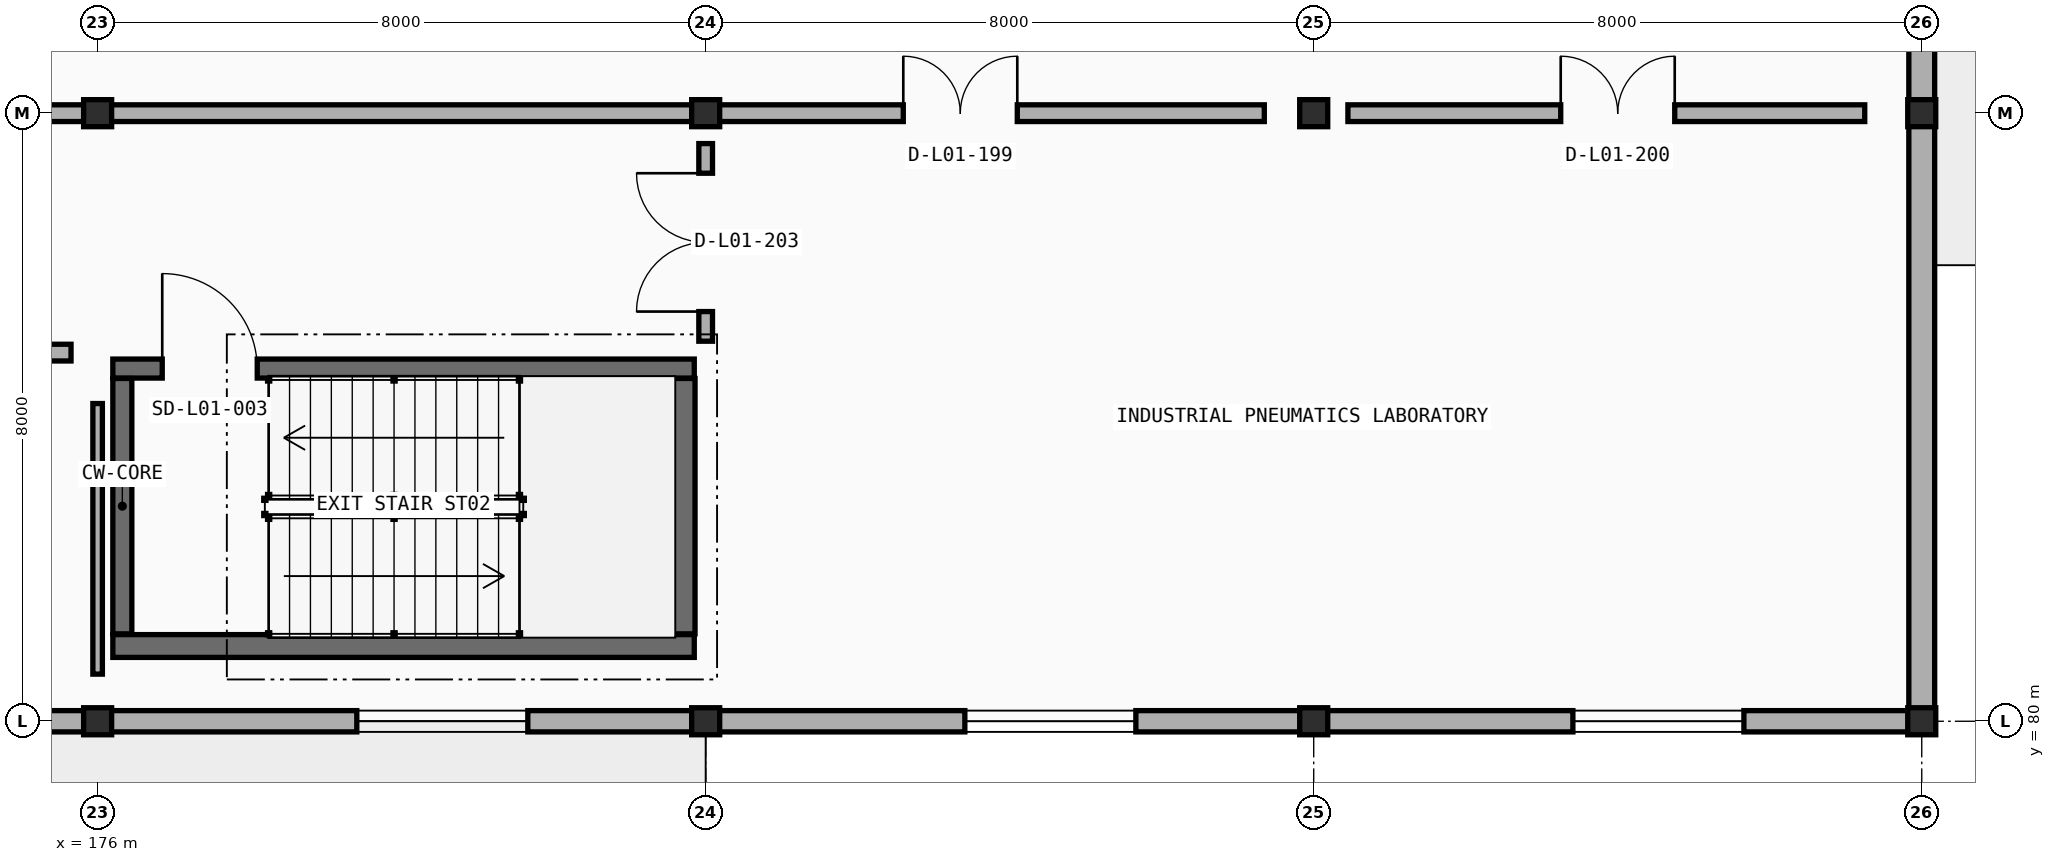
"""IFC4 building model, lengths in metres.
Left out: names, types, materials, properties, quantities, classifications, styles, units other than length and angle.
Written with IfcOpenShell. Run it as: python <this file> out.ifc"""

import sys

from ifc_helpers import new_model, si_unit, direction, frame, frame_2d, origin, origin_2d, place, context, subcontext, project, spatial, rectangle, i_section, extrude, element, fill, save


model = new_model("IFC4")
c1 = context("Model", 3, precision=1e-05, world=origin(), true_north=direction((0.0, 1.0)))
c2 = subcontext(c1, "Body", "Model", "MODEL_VIEW")
j1 = project(units=[si_unit("LENGTHUNIT", "METRE"), si_unit("PLANEANGLEUNIT", "RADIAN")], contexts=[c1])
p1 = place(None, origin())
s1 = spatial("IfcSite", under=j1, at=p1, CompositionType="ELEMENT")
p2 = place(p1, origin())
s2 = spatial("IfcBuilding", under=s1, at=p2, CompositionType="ELEMENT")
p3 = place(p2, origin())
s3 = spatial("IfcBuildingStorey", under=s2, at=p3, CompositionType="ELEMENT", Elevation=0.0)
for number, where, z_axis, x_axis in (
    (1, (176.0, 80.0, 0.0), (0.0, 0.0, 1.0), (1.0, 0.0, 0.0)),
    (2, (184.0, 80.0, 0.0), (0.0, 0.0, 1.0), (1.0, 0.0, 0.0)),
    (3, (192.0, 80.0, 0.0), (0.0, 0.0, 1.0), (1.0, 0.0, 0.0)),
    (4, (200.0, 80.0, 0.0), (0.0, 0.0, 1.0), (1.0, 0.0, 0.0)),
    (5, (176.0, 88.0, 0.0), (0.0, 0.0, 1.0), (1.0, 0.0, 0.0)),
    (6, (184.0, 88.0, 0.0), (0.0, 0.0, 1.0), (1.0, 0.0, 0.0)),
    (7, (192.0, 88.0, 0.0), (0.0, 0.0, 1.0), (1.0, 0.0, 0.0)),
    (8, (200.0, 88.0, 0.0), (0.0, 0.0, 1.0), (1.0, 0.0, 0.0)),
):
    element("IfcColumn", number, at=place(p3, frame(where, z_axis=z_axis, x_axis=x_axis)), inside=s3, PredefinedType="COLUMN", context=c2, shape_type="SweptSolid", body=[
        extrude(i_section(OverallWidth=0.369, OverallDepth=0.356, WebThickness=0.01, FlangeThickness=0.018, FilletRadius=0.015, at=origin_2d()), origin(), (0.0, 0.0, 1.0), 4.8),
    ])
p4 = place(p3, frame((200.0, 87.996, 0.0), z_axis=(0.0, 0.0, 1.0), x_axis=(0.0, -1.0, 0.0)))
e9 = element("IfcWall", 9, at=p4, inside=s3, PredefinedType="STANDARD", context=c2, shape_type="SweptSolid", body=[
    extrude(rectangle(XDim=7.992, YDim=0.34, at=frame_2d((3.996, 0.0))), origin(), (0.0, 0.0, 1.0), 3.745),
])
p5 = place(p3, frame((200.0, 95.996, 0.0), z_axis=(0.0, 0.0, 1.0), x_axis=(0.0, -1.0, 0.0)))
e10 = element("IfcWall", 10, at=p5, inside=s3, PredefinedType="STANDARD", context=c2, shape_type="SweptSolid", body=[
    extrude(rectangle(XDim=7.992, YDim=0.34, at=frame_2d((3.996, 0.0))), origin(), (0.0, 0.0, 1.0), 4.037),
])
p6 = place(p5, frame((1.676, 0.0, 0.0)))
e11 = element("IfcOpeningElement", 11, at=p6, cuts=e10, PredefinedType="OPENING", context=c2, shape_type="SweptSolid", body=[
    extrude(rectangle(XDim=4.2, YDim=3.8, at=frame_2d((2.1, 1.9))), frame((0.0, 0.18, 0.0), z_axis=(0.0, -1.0, 0.0), x_axis=(1.0, 0.0, 0.0)), (0.0, 0.0, 1.0), 0.36),
])
p7 = place(p3, frame((175.996, 80.0, 0.0), z_axis=(0.0, 0.0, 1.0), x_axis=(-1.0, 0.0, 0.0)))
e12 = element("IfcWall", 12, at=p7, inside=s3, PredefinedType="STANDARD", context=c2, shape_type="SweptSolid", body=[
    extrude(rectangle(XDim=7.992, YDim=0.28, at=frame_2d((3.996, 0.0))), origin(), (0.0, 0.0, 1.0), 3.895),
])
p8 = place(p7, frame((2.736, 0.0, 0.0)))
e13 = element("IfcOpeningElement", 13, at=p8, cuts=e12, PredefinedType="OPENING", context=c2, shape_type="SweptSolid", body=[
    extrude(rectangle(XDim=2.0, YDim=2.4, at=frame_2d((1.0, 1.2))), frame((0.0, 0.15, 0.0), z_axis=(0.0, -1.0, 0.0), x_axis=(1.0, 0.0, 0.0)), (0.0, 0.0, 1.0), 0.3),
])
p9 = place(p3, frame((183.996, 80.0, 0.0), z_axis=(0.0, 0.0, 1.0), x_axis=(-1.0, 0.0, 0.0)))
e14 = element("IfcWall", 14, at=p9, inside=s3, PredefinedType="STANDARD", context=c2, shape_type="SweptSolid", body=[
    extrude(rectangle(XDim=7.992, YDim=0.28, at=frame_2d((3.996, 0.0))), origin(), (0.0, 0.0, 1.0), 3.895),
])
p10 = place(p9, frame((2.336, 0.0, 0.95)))
e15 = element("IfcOpeningElement", 15, at=p10, cuts=e14, PredefinedType="OPENING", context=c2, shape_type="SweptSolid", body=[
    extrude(rectangle(XDim=2.25, YDim=2.0, at=frame_2d((1.125, 1.0))), frame((0.0, 0.15, 0.0), z_axis=(0.0, -1.0, 0.0), x_axis=(1.0, 0.0, 0.0)), (0.0, 0.0, 1.0), 0.3),
])
p11 = place(p3, frame((191.996, 80.0, 0.0), z_axis=(0.0, 0.0, 1.0), x_axis=(-1.0, 0.0, 0.0)))
e16 = element("IfcWall", 16, at=p11, inside=s3, PredefinedType="STANDARD", context=c2, shape_type="SweptSolid", body=[
    extrude(rectangle(XDim=7.992, YDim=0.28, at=frame_2d((3.996, 0.0))), origin(), (0.0, 0.0, 1.0), 3.895),
])
p12 = place(p11, frame((2.336, 0.0, 0.95)))
e17 = element("IfcOpeningElement", 17, at=p12, cuts=e16, PredefinedType="OPENING", context=c2, shape_type="SweptSolid", body=[
    extrude(rectangle(XDim=2.25, YDim=2.0, at=frame_2d((1.125, 1.0))), frame((0.0, 0.15, 0.0), z_axis=(0.0, -1.0, 0.0), x_axis=(1.0, 0.0, 0.0)), (0.0, 0.0, 1.0), 0.3),
])
p13 = place(p3, frame((199.996, 80.0, 0.0), z_axis=(0.0, 0.0, 1.0), x_axis=(-1.0, 0.0, 0.0)))
e18 = element("IfcWall", 18, at=p13, inside=s3, PredefinedType="STANDARD", context=c2, shape_type="SweptSolid", body=[
    extrude(rectangle(XDim=7.992, YDim=0.28, at=frame_2d((3.996, 0.0))), origin(), (0.0, 0.0, 1.0), 3.895),
])
p14 = place(p13, frame((2.336, 0.0, 0.95)))
e19 = element("IfcOpeningElement", 19, at=p14, cuts=e18, PredefinedType="OPENING", context=c2, shape_type="SweptSolid", body=[
    extrude(rectangle(XDim=2.25, YDim=2.0, at=frame_2d((1.125, 1.0))), frame((0.0, 0.15, 0.0), z_axis=(0.0, -1.0, 0.0), x_axis=(1.0, 0.0, 0.0)), (0.0, 0.0, 1.0), 0.3),
])
p15 = place(p3, frame((176.2, 80.99, 0.0), z_axis=(0.0, 0.0, 1.0), x_axis=(1.0, 0.0, 0.0)))
e20 = element("IfcWall", 20, at=p15, inside=s3, PredefinedType="SHEAR", context=c2, shape_type="SweptSolid", body=[
    extrude(rectangle(XDim=7.65, YDim=0.3, at=frame_2d((3.825, 0.0))), origin(), (0.0, 0.0, 1.0), 4.8),
])
p16 = place(p3, frame((183.71, 81.15, 0.0), z_axis=(0.0, 0.0, 1.0), x_axis=(0.0, 1.0, 0.0)))
e21 = element("IfcWall", 21, at=p16, inside=s3, PredefinedType="SHEAR", context=c2, shape_type="SweptSolid", body=[
    extrude(rectangle(XDim=3.36, YDim=0.3, at=frame_2d((1.68, 0.0))), origin(), (0.0, 0.0, 1.0), 4.8),
])
p17 = place(p3, frame((176.2, 84.64, 0.0), z_axis=(0.0, 0.0, 1.0), x_axis=(1.0, 0.0, 0.0)))
e22 = element("IfcWall", 22, at=p17, inside=s3, PredefinedType="SOLIDWALL", context=c2, shape_type="SweptSolid", body=[
    extrude(rectangle(XDim=7.65, YDim=0.25, at=frame_2d((3.825, 0.0))), origin(), (0.0, 0.0, 1.0), 4.8),
])
p18 = place(p17, frame((0.65, 0.0, 0.0)))
e23 = element("IfcOpeningElement", 23, at=p18, cuts=e22, PredefinedType="OPENING", context=c2, shape_type="SweptSolid", body=[
    extrude(rectangle(XDim=1.25, YDim=2.15, at=frame_2d((0.625, 1.075))), frame((0.0, 0.135, 0.0), z_axis=(0.0, -1.0, 0.0), x_axis=(1.0, 0.0, 0.0)), (0.0, 0.0, 1.0), 0.27),
])
p19 = place(p3, frame((176.325, 81.15, 0.0), z_axis=(0.0, 0.0, 1.0), x_axis=(0.0, 1.0, 0.0)))
e24 = element("IfcWall", 24, at=p19, inside=s3, PredefinedType="SOLIDWALL", context=c2, shape_type="SweptSolid", body=[
    extrude(rectangle(XDim=3.36, YDim=0.25, at=frame_2d((1.68, 0.0))), origin(), (0.0, 0.0, 1.0), 4.8),
])
p20 = place(p3, frame((168.65, 88.0, 0.0), z_axis=(0.0, 0.0, 1.0), x_axis=(1.0, 0.0, 0.0)))
e25 = element("IfcWall", 25, at=p20, inside=s3, PredefinedType="PARTITIONING", context=c2, shape_type="SweptSolid", body=[
    extrude(rectangle(XDim=22.7, YDim=0.22, at=frame_2d((11.35, 0.0))), origin(), (0.0, 0.0, 1.0), 3.795),
])
p21 = place(p20, frame((2.6, 0.0, 0.0)))
e26 = element("IfcOpeningElement", 26, at=p21, cuts=e25, PredefinedType="OPENING", context=c2, shape_type="SweptSolid", body=[
    extrude(rectangle(XDim=1.5, YDim=2.2, at=frame_2d((0.75, 1.1))), frame((0.0, 0.12, 0.0), z_axis=(0.0, -1.0, 0.0), x_axis=(1.0, 0.0, 0.0)), (0.0, 0.0, 1.0), 0.24),
])
p22 = place(p20, frame((17.95, 0.0, 0.0)))
e27 = element("IfcOpeningElement", 27, at=p22, cuts=e25, PredefinedType="OPENING", context=c2, shape_type="SweptSolid", body=[
    extrude(rectangle(XDim=1.5, YDim=2.2, at=frame_2d((0.75, 1.1))), frame((0.0, 0.12, 0.0), z_axis=(0.0, -1.0, 0.0), x_axis=(1.0, 0.0, 0.0)), (0.0, 0.0, 1.0), 0.24),
])
p23 = place(p3, frame((192.45, 88.0, 0.0), z_axis=(0.0, 0.0, 1.0), x_axis=(1.0, 0.0, 0.0)))
e28 = element("IfcWall", 28, at=p23, inside=s3, PredefinedType="PARTITIONING", context=c2, shape_type="SweptSolid", body=[
    extrude(rectangle(XDim=6.8, YDim=0.22, at=frame_2d((3.4, 0.0))), origin(), (0.0, 0.0, 1.0), 3.795),
])
p24 = place(p23, frame((2.8, 0.0, 0.0)))
e29 = element("IfcOpeningElement", 29, at=p24, cuts=e28, PredefinedType="OPENING", context=c2, shape_type="SweptSolid", body=[
    extrude(rectangle(XDim=1.5, YDim=2.2, at=frame_2d((0.75, 1.1))), frame((0.0, 0.12, 0.0), z_axis=(0.0, -1.0, 0.0), x_axis=(1.0, 0.0, 0.0)), (0.0, 0.0, 1.0), 0.24),
])
p25 = place(p3, frame((144.55, 84.85, 0.0), z_axis=(0.0, 0.0, 1.0), x_axis=(1.0, 0.0, 0.0)))
e30 = element("IfcWall", 30, at=p25, inside=s3, PredefinedType="PARTITIONING", context=c2, shape_type="SweptSolid", body=[
    extrude(rectangle(XDim=31.1, YDim=0.22, at=frame_2d((15.55, 0.0))), origin(), (0.0, 0.0, 1.0), 3.9),
])
p26 = place(p25, frame((2.7, 0.0, 0.0)))
e31 = element("IfcOpeningElement", 31, at=p26, cuts=e30, PredefinedType="OPENING", context=c2, shape_type="SweptSolid", body=[
    extrude(rectangle(XDim=1.5, YDim=2.2, at=frame_2d((0.75, 1.1))), frame((0.0, 0.12, 0.0), z_axis=(0.0, -1.0, 0.0), x_axis=(1.0, 0.0, 0.0)), (0.0, 0.0, 1.0), 0.24),
])
p27 = place(p3, frame((176.0, 80.62, 0.0), z_axis=(0.0, 0.0, 1.0), x_axis=(0.0, 1.0, 0.0)))
e32 = element("IfcWall", 32, at=p27, inside=s3, PredefinedType="PARTITIONING", context=c2, shape_type="SweptSolid", body=[
    extrude(rectangle(XDim=3.56, YDim=0.125, at=frame_2d((1.78, 0.0))), origin(), (0.0, 0.0, 1.0), 3.745),
])
p28 = place(p3, frame((184.0, 85.0, 0.0), z_axis=(0.0, 0.0, 1.0), x_axis=(0.0, 1.0, 0.0)))
e33 = element("IfcWall", 33, at=p28, inside=s3, PredefinedType="PARTITIONING", context=c2, shape_type="SweptSolid", body=[
    extrude(rectangle(XDim=2.6, YDim=0.18, at=frame_2d((1.3, 0.0))), origin(), (0.0, 0.0, 1.0), 3.745),
])
p29 = place(p28, frame((0.39, 0.0, 0.0)))
e34 = element("IfcOpeningElement", 34, at=p29, cuts=e33, PredefinedType="OPENING", context=c2, shape_type="SweptSolid", body=[
    extrude(rectangle(XDim=1.82, YDim=2.25, at=frame_2d((0.91, 1.125))), frame((0.0, 0.1, 0.0), z_axis=(0.0, -1.0, 0.0), x_axis=(1.0, 0.0, 0.0)), (0.0, 0.0, 1.0), 0.2),
])
p30 = place(p10, origin())
e35 = element("IfcWindow", 35, at=p30, inside=s3, PartitioningType="DOUBLE_PANEL_VERTICAL", PredefinedType="WINDOW", context=c2, shape_type="SweptSolid", body=[
    extrude(rectangle(XDim=2.25, YDim=2.0, at=frame_2d((1.125, 1.0))), frame((0.0, 0.03, 0.0), z_axis=(0.0, -1.0, 0.0), x_axis=(1.0, 0.0, 0.0)), (0.0, 0.0, 1.0), 0.06),
])
fill(e15, e35)
p31 = place(p12, origin())
e36 = element("IfcWindow", 36, at=p31, inside=s3, PartitioningType="DOUBLE_PANEL_VERTICAL", PredefinedType="WINDOW", context=c2, shape_type="SweptSolid", body=[
    extrude(rectangle(XDim=2.25, YDim=2.0, at=frame_2d((1.125, 1.0))), frame((0.0, 0.03, 0.0), z_axis=(0.0, -1.0, 0.0), x_axis=(1.0, 0.0, 0.0)), (0.0, 0.0, 1.0), 0.06),
])
fill(e17, e36)
p32 = place(p14, origin())
e37 = element("IfcWindow", 37, at=p32, inside=s3, PartitioningType="DOUBLE_PANEL_VERTICAL", PredefinedType="WINDOW", context=c2, shape_type="SweptSolid", body=[
    extrude(rectangle(XDim=2.25, YDim=2.0, at=frame_2d((1.125, 1.0))), frame((0.0, 0.03, 0.0), z_axis=(0.0, -1.0, 0.0), x_axis=(1.0, 0.0, 0.0)), (0.0, 0.0, 1.0), 0.06),
])
fill(e19, e37)
p33 = place(p18, origin())
e38 = element("IfcDoor", 38, at=p33, inside=s3, OperationType="SINGLE_SWING_LEFT", PredefinedType="DOOR", context=c2, shape_type="SweptSolid", body=[
    extrude(rectangle(XDim=1.25, YDim=2.15, at=frame_2d((0.625, 1.075))), frame((0.0, 0.025, 0.0), z_axis=(0.0, -1.0, 0.0), x_axis=(1.0, 0.0, 0.0)), (0.0, 0.0, 1.0), 0.05),
])
fill(e23, e38)
p34 = place(p22, origin())
e39 = element("IfcDoor", 39, at=p34, inside=s3, OperationType="DOUBLE_DOOR_SINGLE_SWING", PredefinedType="DOOR", context=c2, shape_type="SweptSolid", body=[
    extrude(rectangle(XDim=1.5, YDim=2.2, at=frame_2d((0.75, 1.1))), frame((0.0, 0.025, 0.0), z_axis=(0.0, -1.0, 0.0), x_axis=(1.0, 0.0, 0.0)), (0.0, 0.0, 1.0), 0.05),
])
fill(e27, e39)
p35 = place(p24, origin())
e40 = element("IfcDoor", 40, at=p35, inside=s3, OperationType="DOUBLE_DOOR_SINGLE_SWING", PredefinedType="DOOR", context=c2, shape_type="SweptSolid", body=[
    extrude(rectangle(XDim=1.5, YDim=2.2, at=frame_2d((0.75, 1.1))), frame((0.0, 0.025, 0.0), z_axis=(0.0, -1.0, 0.0), x_axis=(1.0, 0.0, 0.0)), (0.0, 0.0, 1.0), 0.05),
])
fill(e29, e40)
p36 = place(p29, origin())
e41 = element("IfcDoor", 41, at=p36, inside=s3, OperationType="DOUBLE_DOOR_SINGLE_SWING", PredefinedType="DOOR", context=c2, shape_type="SweptSolid", body=[
    extrude(rectangle(XDim=1.82, YDim=2.25, at=frame_2d((0.91, 1.125))), frame((0.0, 0.025, 0.0), z_axis=(0.0, -1.0, 0.0), x_axis=(1.0, 0.0, 0.0)), (0.0, 0.0, 1.0), 0.05),
])
fill(e34, e41)
save(model, sys.argv[1])
